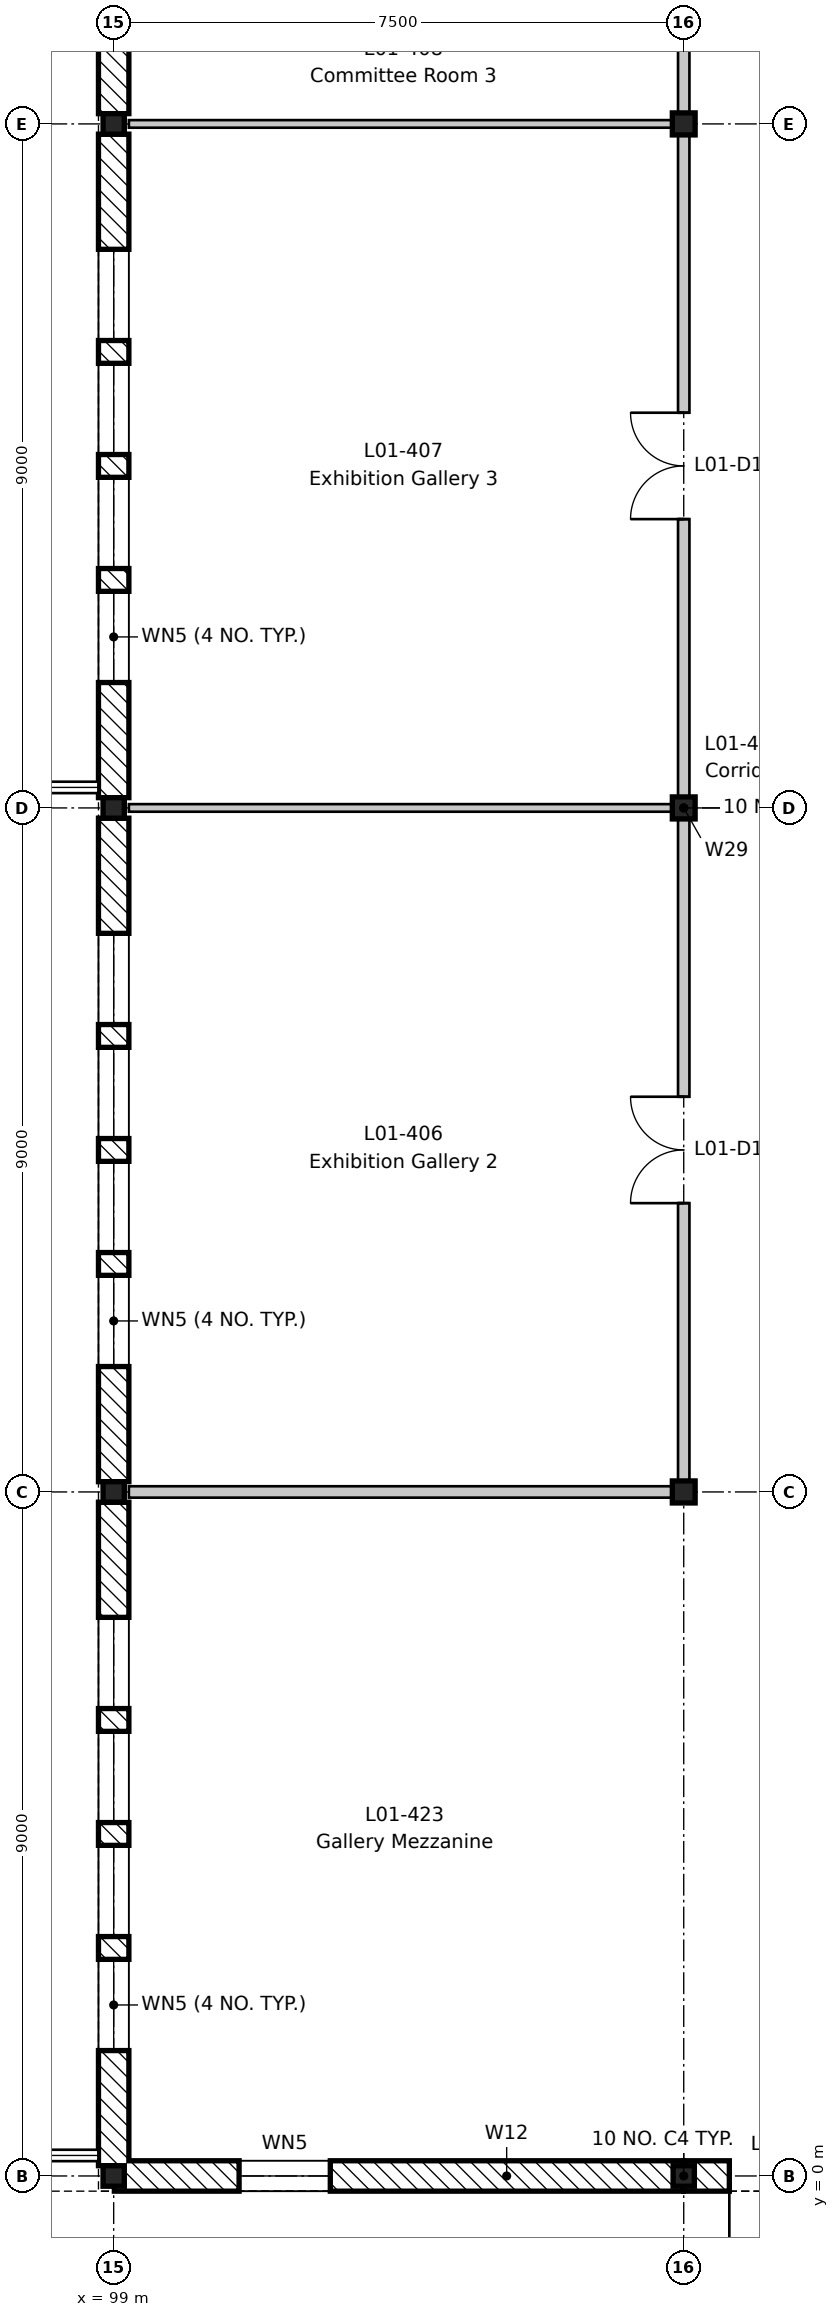
"""IFC4 building model, lengths in metres.
Left out: names, types, materials, properties, quantities, classifications, styles, units other than length and angle.
Written with IfcOpenShell. Run it as: python <this file> out.ifc"""

import sys

from ifc_helpers import new_model, si_unit, direction, frame, frame_2d, origin, origin_2d, place, context, subcontext, project, spatial, rectangle, i_section, extrude, element, fill, save


model = new_model("IFC4")
c1 = context("Model", 3, precision=1e-05, world=origin(), true_north=direction((0.0, 1.0)))
c2 = subcontext(c1, "Body", "Model", "MODEL_VIEW")
j1 = project(units=[si_unit("LENGTHUNIT", "METRE"), si_unit("PLANEANGLEUNIT", "RADIAN")], contexts=[c1])
p1 = place(None, origin())
s1 = spatial("IfcSite", under=j1, at=p1, CompositionType="ELEMENT")
p2 = place(p1, origin())
s2 = spatial("IfcBuilding", under=s1, at=p2, CompositionType="ELEMENT")
p3 = place(p2, frame((0.0, 0.0, 5.4)))
s3 = spatial("IfcBuildingStorey", under=s2, at=p3, CompositionType="ELEMENT", Elevation=5.4)
for number, where, z_axis, x_axis in (
    (1, (99.0, 0.0, -0.2), (0.0, 0.0, 1.0), (1.0, 0.0, 0.0)),
    (2, (99.0, 9.0, -0.2), (0.0, 0.0, 1.0), (1.0, 0.0, 0.0)),
    (3, (99.0, 18.0, -0.2), (0.0, 0.0, 1.0), (1.0, 0.0, 0.0)),
    (4, (99.0, 27.0, -0.2), (0.0, 0.0, 1.0), (1.0, 0.0, 0.0)),
    (5, (106.5, 0.0, -0.2), (0.0, 0.0, 1.0), (1.0, 0.0, 0.0)),
):
    element("IfcColumn", number, at=place(p3, frame(where, z_axis=z_axis, x_axis=x_axis)), inside=s3, PredefinedType="COLUMN", context=c2, shape_type="SweptSolid", body=[
        extrude(i_section(OverallWidth=0.28, OverallDepth=0.27, WebThickness=0.008, FlangeThickness=0.013, FilletRadius=0.024, at=origin_2d()), origin(), (0.0, 0.0, 1.0), 4.5),
    ])
for number, where, z_axis, x_axis in (
    (6, (106.5, 9.0, -0.2), (0.0, 0.0, 1.0), (1.0, 0.0, 0.0)),
    (7, (106.5, 18.0, -0.2), (0.0, 0.0, 1.0), (1.0, 0.0, 0.0)),
    (8, (106.5, 27.0, -0.2), (0.0, 0.0, 1.0), (1.0, 0.0, 0.0)),
):
    element("IfcColumn", number, at=place(p3, frame(where, z_axis=z_axis, x_axis=x_axis)), inside=s3, PredefinedType="COLUMN", context=c2, shape_type="SweptSolid", body=[
        extrude(i_section(OverallWidth=0.3, OverallDepth=0.29, WebThickness=0.009, FlangeThickness=0.014, FilletRadius=0.027, at=origin_2d()), origin(), (0.0, 0.0, 1.0), 4.5),
    ])
p4 = place(p3, frame((99.0, 0.135, 0.0), z_axis=(0.0, 0.0, 1.0), x_axis=(0.0, 1.0, 0.0)))
e9 = element("IfcWall", 9, at=p4, inside=s3, PredefinedType="STANDARD", context=c2, shape_type="SweptSolid", body=[
    extrude(rectangle(XDim=8.73, YDim=0.4, at=frame_2d((4.365, 0.0))), origin(), (0.0, 0.0, 1.0), 3.9),
])
p5 = place(p4, frame((1.515, 0.0, 0.6)))
e10 = element("IfcOpeningElement", 10, at=p5, cuts=e9, PredefinedType="OPENING", context=c2, shape_type="SweptSolid", body=[
    extrude(rectangle(XDim=1.2, YDim=3.0, at=frame_2d((0.6, 1.5))), frame((0.0, 0.21, 0.0), z_axis=(0.0, -1.0, 0.0), x_axis=(1.0, 0.0, 0.0)), (0.0, 0.0, 1.0), 0.42),
])
p6 = place(p4, frame((3.015, 0.0, 0.6)))
e11 = element("IfcOpeningElement", 11, at=p6, cuts=e9, PredefinedType="OPENING", context=c2, shape_type="SweptSolid", body=[
    extrude(rectangle(XDim=1.2, YDim=3.0, at=frame_2d((0.6, 1.5))), frame((0.0, 0.21, 0.0), z_axis=(0.0, -1.0, 0.0), x_axis=(1.0, 0.0, 0.0)), (0.0, 0.0, 1.0), 0.42),
])
p7 = place(p4, frame((4.515, 0.0, 0.6)))
e12 = element("IfcOpeningElement", 12, at=p7, cuts=e9, PredefinedType="OPENING", context=c2, shape_type="SweptSolid", body=[
    extrude(rectangle(XDim=1.2, YDim=3.0, at=frame_2d((0.6, 1.5))), frame((0.0, 0.21, 0.0), z_axis=(0.0, -1.0, 0.0), x_axis=(1.0, 0.0, 0.0)), (0.0, 0.0, 1.0), 0.42),
])
p8 = place(p4, frame((6.015, 0.0, 0.6)))
e13 = element("IfcOpeningElement", 13, at=p8, cuts=e9, PredefinedType="OPENING", context=c2, shape_type="SweptSolid", body=[
    extrude(rectangle(XDim=1.2, YDim=3.0, at=frame_2d((0.6, 1.5))), frame((0.0, 0.21, 0.0), z_axis=(0.0, -1.0, 0.0), x_axis=(1.0, 0.0, 0.0)), (0.0, 0.0, 1.0), 0.42),
])
p9 = place(p3, frame((99.0, 9.135, 0.0), z_axis=(0.0, 0.0, 1.0), x_axis=(0.0, 1.0, 0.0)))
e14 = element("IfcWall", 14, at=p9, inside=s3, PredefinedType="STANDARD", context=c2, shape_type="SweptSolid", body=[
    extrude(rectangle(XDim=8.73, YDim=0.4, at=frame_2d((4.365, 0.0))), origin(), (0.0, 0.0, 1.0), 3.9),
])
p10 = place(p9, frame((1.515, 0.0, 0.6)))
e15 = element("IfcOpeningElement", 15, at=p10, cuts=e14, PredefinedType="OPENING", context=c2, shape_type="SweptSolid", body=[
    extrude(rectangle(XDim=1.2, YDim=3.0, at=frame_2d((0.6, 1.5))), frame((0.0, 0.21, 0.0), z_axis=(0.0, -1.0, 0.0), x_axis=(1.0, 0.0, 0.0)), (0.0, 0.0, 1.0), 0.42),
])
p11 = place(p9, frame((3.015, 0.0, 0.6)))
e16 = element("IfcOpeningElement", 16, at=p11, cuts=e14, PredefinedType="OPENING", context=c2, shape_type="SweptSolid", body=[
    extrude(rectangle(XDim=1.2, YDim=3.0, at=frame_2d((0.6, 1.5))), frame((0.0, 0.21, 0.0), z_axis=(0.0, -1.0, 0.0), x_axis=(1.0, 0.0, 0.0)), (0.0, 0.0, 1.0), 0.42),
])
p12 = place(p9, frame((4.515, 0.0, 0.6)))
e17 = element("IfcOpeningElement", 17, at=p12, cuts=e14, PredefinedType="OPENING", context=c2, shape_type="SweptSolid", body=[
    extrude(rectangle(XDim=1.2, YDim=3.0, at=frame_2d((0.6, 1.5))), frame((0.0, 0.21, 0.0), z_axis=(0.0, -1.0, 0.0), x_axis=(1.0, 0.0, 0.0)), (0.0, 0.0, 1.0), 0.42),
])
p13 = place(p9, frame((6.015, 0.0, 0.6)))
e18 = element("IfcOpeningElement", 18, at=p13, cuts=e14, PredefinedType="OPENING", context=c2, shape_type="SweptSolid", body=[
    extrude(rectangle(XDim=1.2, YDim=3.0, at=frame_2d((0.6, 1.5))), frame((0.0, 0.21, 0.0), z_axis=(0.0, -1.0, 0.0), x_axis=(1.0, 0.0, 0.0)), (0.0, 0.0, 1.0), 0.42),
])
p14 = place(p3, frame((99.0, 18.135, 0.0), z_axis=(0.0, 0.0, 1.0), x_axis=(0.0, 1.0, 0.0)))
e19 = element("IfcWall", 19, at=p14, inside=s3, PredefinedType="STANDARD", context=c2, shape_type="SweptSolid", body=[
    extrude(rectangle(XDim=8.73, YDim=0.4, at=frame_2d((4.365, 0.0))), origin(), (0.0, 0.0, 1.0), 3.9),
])
p15 = place(p14, frame((1.515, 0.0, 0.6)))
e20 = element("IfcOpeningElement", 20, at=p15, cuts=e19, PredefinedType="OPENING", context=c2, shape_type="SweptSolid", body=[
    extrude(rectangle(XDim=1.2, YDim=3.0, at=frame_2d((0.6, 1.5))), frame((0.0, 0.21, 0.0), z_axis=(0.0, -1.0, 0.0), x_axis=(1.0, 0.0, 0.0)), (0.0, 0.0, 1.0), 0.42),
])
p16 = place(p14, frame((3.015, 0.0, 0.6)))
e21 = element("IfcOpeningElement", 21, at=p16, cuts=e19, PredefinedType="OPENING", context=c2, shape_type="SweptSolid", body=[
    extrude(rectangle(XDim=1.2, YDim=3.0, at=frame_2d((0.6, 1.5))), frame((0.0, 0.21, 0.0), z_axis=(0.0, -1.0, 0.0), x_axis=(1.0, 0.0, 0.0)), (0.0, 0.0, 1.0), 0.42),
])
p17 = place(p14, frame((4.515, 0.0, 0.6)))
e22 = element("IfcOpeningElement", 22, at=p17, cuts=e19, PredefinedType="OPENING", context=c2, shape_type="SweptSolid", body=[
    extrude(rectangle(XDim=1.2, YDim=3.0, at=frame_2d((0.6, 1.5))), frame((0.0, 0.21, 0.0), z_axis=(0.0, -1.0, 0.0), x_axis=(1.0, 0.0, 0.0)), (0.0, 0.0, 1.0), 0.42),
])
p18 = place(p14, frame((6.015, 0.0, 0.6)))
e23 = element("IfcOpeningElement", 23, at=p18, cuts=e19, PredefinedType="OPENING", context=c2, shape_type="SweptSolid", body=[
    extrude(rectangle(XDim=1.2, YDim=3.0, at=frame_2d((0.6, 1.5))), frame((0.0, 0.21, 0.0), z_axis=(0.0, -1.0, 0.0), x_axis=(1.0, 0.0, 0.0)), (0.0, 0.0, 1.0), 0.42),
])
p19 = place(p3, frame((99.0, 27.135, 0.0), z_axis=(0.0, 0.0, 1.0), x_axis=(0.0, 1.0, 0.0)))
e24 = element("IfcWall", 24, at=p19, inside=s3, PredefinedType="STANDARD", context=c2, shape_type="SweptSolid", body=[
    extrude(rectangle(XDim=8.73, YDim=0.4, at=frame_2d((4.365, 0.0))), origin(), (0.0, 0.0, 1.0), 3.9),
])
p20 = place(p19, frame((1.515, 0.0, 0.6)))
e25 = element("IfcOpeningElement", 25, at=p20, cuts=e24, PredefinedType="OPENING", context=c2, shape_type="SweptSolid", body=[
    extrude(rectangle(XDim=1.2, YDim=3.0, at=frame_2d((0.6, 1.5))), frame((0.0, 0.21, 0.0), z_axis=(0.0, -1.0, 0.0), x_axis=(1.0, 0.0, 0.0)), (0.0, 0.0, 1.0), 0.42),
])
p21 = place(p19, frame((3.015, 0.0, 0.6)))
e26 = element("IfcOpeningElement", 26, at=p21, cuts=e24, PredefinedType="OPENING", context=c2, shape_type="SweptSolid", body=[
    extrude(rectangle(XDim=1.2, YDim=3.0, at=frame_2d((0.6, 1.5))), frame((0.0, 0.21, 0.0), z_axis=(0.0, -1.0, 0.0), x_axis=(1.0, 0.0, 0.0)), (0.0, 0.0, 1.0), 0.42),
])
p22 = place(p19, frame((4.515, 0.0, 0.6)))
e27 = element("IfcOpeningElement", 27, at=p22, cuts=e24, PredefinedType="OPENING", context=c2, shape_type="SweptSolid", body=[
    extrude(rectangle(XDim=1.2, YDim=3.0, at=frame_2d((0.6, 1.5))), frame((0.0, 0.21, 0.0), z_axis=(0.0, -1.0, 0.0), x_axis=(1.0, 0.0, 0.0)), (0.0, 0.0, 1.0), 0.42),
])
p23 = place(p19, frame((6.015, 0.0, 0.6)))
e28 = element("IfcOpeningElement", 28, at=p23, cuts=e24, PredefinedType="OPENING", context=c2, shape_type="SweptSolid", body=[
    extrude(rectangle(XDim=1.2, YDim=3.0, at=frame_2d((0.6, 1.5))), frame((0.0, 0.21, 0.0), z_axis=(0.0, -1.0, 0.0), x_axis=(1.0, 0.0, 0.0)), (0.0, 0.0, 1.0), 0.42),
])
p24 = place(p3, frame((106.491, 0.0, 0.0), z_axis=(0.0, 0.0, 1.0), x_axis=(-1.0, 0.0, 0.0)))
e29 = element("IfcWall", 29, at=p24, inside=s3, PredefinedType="STANDARD", context=c2, shape_type="SweptSolid", body=[
    extrude(rectangle(XDim=7.482, YDim=0.4, at=frame_2d((3.741, 0.0))), origin(), (0.0, 0.0, 1.0), 3.97),
])
p25 = place(p24, frame((4.641, 0.0, 0.6)))
e30 = element("IfcOpeningElement", 30, at=p25, cuts=e29, PredefinedType="OPENING", context=c2, shape_type="SweptSolid", body=[
    extrude(rectangle(XDim=1.2, YDim=3.0, at=frame_2d((0.6, 1.5))), frame((0.0, 0.21, 0.0), z_axis=(0.0, -1.0, 0.0), x_axis=(1.0, 0.0, 0.0)), (0.0, 0.0, 1.0), 0.42),
])
p26 = place(p3, frame((109.491, 0.0, 0.0), z_axis=(0.0, 0.0, 1.0), x_axis=(-1.0, 0.0, 0.0)))
e31 = element("IfcWall", 31, at=p26, inside=s3, PredefinedType="STANDARD", context=c2, shape_type="SweptSolid", body=[
    extrude(rectangle(XDim=2.982, YDim=0.4, at=frame_2d((1.491, 0.0))), origin(), (0.0, 0.0, 1.0), 4.1),
])
p27 = place(p26, frame((0.591, 0.0, 0.0)))
e32 = element("IfcOpeningElement", 32, at=p27, cuts=e31, PredefinedType="OPENING", context=c2, shape_type="SweptSolid", body=[
    extrude(rectangle(XDim=1.8, YDim=2.4, at=frame_2d((0.9, 1.2))), frame((0.0, 0.21, 0.0), z_axis=(0.0, -1.0, 0.0), x_axis=(1.0, 0.0, 0.0)), (0.0, 0.0, 1.0), 0.42),
])
p28 = place(p3, frame((99.2, 9.0, 0.0), z_axis=(0.0, 0.0, 1.0), x_axis=(1.0, 0.0, 0.0)))
e33 = element("IfcWall", 33, at=p28, inside=s3, PredefinedType="PARTITIONING", context=c2, shape_type="SweptSolid", body=[
    extrude(rectangle(XDim=7.225, YDim=0.15, at=frame_2d((3.613, 0.0))), origin(), (0.0, 0.0, 1.0), 3.95),
])
for number, where, z_axis, x_axis in (
    (34, (99.2, 18.0, 0.0), (0.0, 0.0, 1.0), (1.0, 0.0, 0.0)),
    (35, (99.2, 27.0, 0.0), (0.0, 0.0, 1.0), (1.0, 0.0, 0.0)),
):
    element("IfcWall", number, at=place(p3, frame(where, z_axis=z_axis, x_axis=x_axis)), inside=s3, PredefinedType="PARTITIONING", context=c2, shape_type="SweptSolid", body=[
        extrude(rectangle(XDim=7.225, YDim=0.1, at=frame_2d((3.613, 0.0))), origin(), (0.0, 0.0, 1.0), 3.95),
    ])
p29 = place(p3, frame((106.5, 9.0, 0.0), z_axis=(0.0, 0.0, 1.0), x_axis=(0.0, 1.0, 0.0)))
e36 = element("IfcWall", 36, at=p29, inside=s3, PredefinedType="PARTITIONING", context=c2, shape_type="SweptSolid", body=[
    extrude(rectangle(XDim=44.8, YDim=0.15, at=frame_2d((22.4, 0.0))), origin(), (0.0, 0.0, 1.0), 3.78),
])
p30 = place(p29, frame((3.8, 0.0, 0.0)))
e37 = element("IfcOpeningElement", 37, at=p30, cuts=e36, PredefinedType="OPENING", context=c2, shape_type="SweptSolid", body=[
    extrude(rectangle(XDim=1.4, YDim=2.1, at=frame_2d((0.7, 1.05))), frame((0.0, 0.085, 0.0), z_axis=(0.0, -1.0, 0.0), x_axis=(1.0, 0.0, 0.0)), (0.0, 0.0, 1.0), 0.17),
])
p31 = place(p29, frame((12.8, 0.0, 0.0)))
e38 = element("IfcOpeningElement", 38, at=p31, cuts=e36, PredefinedType="OPENING", context=c2, shape_type="SweptSolid", body=[
    extrude(rectangle(XDim=1.4, YDim=2.1, at=frame_2d((0.7, 1.05))), frame((0.0, 0.085, 0.0), z_axis=(0.0, -1.0, 0.0), x_axis=(1.0, 0.0, 0.0)), (0.0, 0.0, 1.0), 0.17),
])
p32 = place(p29, frame((20.5, 0.0, 0.0)))
e39 = element("IfcOpeningElement", 39, at=p32, cuts=e36, PredefinedType="OPENING", context=c2, shape_type="SweptSolid", body=[
    extrude(rectangle(XDim=1.0, YDim=2.1, at=frame_2d((0.5, 1.05))), frame((0.0, 0.085, 0.0), z_axis=(0.0, -1.0, 0.0), x_axis=(1.0, 0.0, 0.0)), (0.0, 0.0, 1.0), 0.17),
])
p33 = place(p29, frame((27.8, 0.0, 0.0)))
e40 = element("IfcOpeningElement", 40, at=p33, cuts=e36, PredefinedType="OPENING", context=c2, shape_type="SweptSolid", body=[
    extrude(rectangle(XDim=1.4, YDim=2.1, at=frame_2d((0.7, 1.05))), frame((0.0, 0.085, 0.0), z_axis=(0.0, -1.0, 0.0), x_axis=(1.0, 0.0, 0.0)), (0.0, 0.0, 1.0), 0.17),
])
p34 = place(p29, frame((36.75, 0.0, 0.0)))
e41 = element("IfcOpeningElement", 41, at=p34, cuts=e36, PredefinedType="OPENING", context=c2, shape_type="SweptSolid", body=[
    extrude(rectangle(XDim=1.0, YDim=2.1, at=frame_2d((0.5, 1.05))), frame((0.0, 0.085, 0.0), z_axis=(0.0, -1.0, 0.0), x_axis=(1.0, 0.0, 0.0)), (0.0, 0.0, 1.0), 0.17),
])
p35 = place(p29, frame((40.0, 0.0, 0.0)))
e42 = element("IfcOpeningElement", 42, at=p35, cuts=e36, PredefinedType="OPENING", context=c2, shape_type="SweptSolid", body=[
    extrude(rectangle(XDim=1.0, YDim=2.1, at=frame_2d((0.5, 1.05))), frame((0.0, 0.085, 0.0), z_axis=(0.0, -1.0, 0.0), x_axis=(1.0, 0.0, 0.0)), (0.0, 0.0, 1.0), 0.17),
])
p36 = place(p29, frame((43.0, 0.0, 0.0)))
e43 = element("IfcOpeningElement", 43, at=p36, cuts=e36, PredefinedType="OPENING", context=c2, shape_type="SweptSolid", body=[
    extrude(rectangle(XDim=1.0, YDim=2.1, at=frame_2d((0.5, 1.05))), frame((0.0, 0.085, 0.0), z_axis=(0.0, -1.0, 0.0), x_axis=(1.0, 0.0, 0.0)), (0.0, 0.0, 1.0), 0.17),
])
p37 = place(p5, origin())
e44 = element("IfcWindow", 44, at=p37, inside=s3, PartitioningType="SINGLE_PANEL", PredefinedType="WINDOW", context=c2, shape_type="SweptSolid", body=[
    extrude(rectangle(XDim=1.2, YDim=3.0, at=frame_2d((0.6, 1.5))), frame((0.0, 0.03, 0.0), z_axis=(0.0, -1.0, 0.0), x_axis=(1.0, 0.0, 0.0)), (0.0, 0.0, 1.0), 0.06),
])
fill(e10, e44)
p38 = place(p6, origin())
e45 = element("IfcWindow", 45, at=p38, inside=s3, PartitioningType="SINGLE_PANEL", PredefinedType="WINDOW", context=c2, shape_type="SweptSolid", body=[
    extrude(rectangle(XDim=1.2, YDim=3.0, at=frame_2d((0.6, 1.5))), frame((0.0, 0.03, 0.0), z_axis=(0.0, -1.0, 0.0), x_axis=(1.0, 0.0, 0.0)), (0.0, 0.0, 1.0), 0.06),
])
fill(e11, e45)
p39 = place(p7, origin())
e46 = element("IfcWindow", 46, at=p39, inside=s3, PartitioningType="SINGLE_PANEL", PredefinedType="WINDOW", context=c2, shape_type="SweptSolid", body=[
    extrude(rectangle(XDim=1.2, YDim=3.0, at=frame_2d((0.6, 1.5))), frame((0.0, 0.03, 0.0), z_axis=(0.0, -1.0, 0.0), x_axis=(1.0, 0.0, 0.0)), (0.0, 0.0, 1.0), 0.06),
])
fill(e12, e46)
p40 = place(p8, origin())
e47 = element("IfcWindow", 47, at=p40, inside=s3, PartitioningType="SINGLE_PANEL", PredefinedType="WINDOW", context=c2, shape_type="SweptSolid", body=[
    extrude(rectangle(XDim=1.2, YDim=3.0, at=frame_2d((0.6, 1.5))), frame((0.0, 0.03, 0.0), z_axis=(0.0, -1.0, 0.0), x_axis=(1.0, 0.0, 0.0)), (0.0, 0.0, 1.0), 0.06),
])
fill(e13, e47)
p41 = place(p10, origin())
e48 = element("IfcWindow", 48, at=p41, inside=s3, PartitioningType="SINGLE_PANEL", PredefinedType="WINDOW", context=c2, shape_type="SweptSolid", body=[
    extrude(rectangle(XDim=1.2, YDim=3.0, at=frame_2d((0.6, 1.5))), frame((0.0, 0.03, 0.0), z_axis=(0.0, -1.0, 0.0), x_axis=(1.0, 0.0, 0.0)), (0.0, 0.0, 1.0), 0.06),
])
fill(e15, e48)
p42 = place(p11, origin())
e49 = element("IfcWindow", 49, at=p42, inside=s3, PartitioningType="SINGLE_PANEL", PredefinedType="WINDOW", context=c2, shape_type="SweptSolid", body=[
    extrude(rectangle(XDim=1.2, YDim=3.0, at=frame_2d((0.6, 1.5))), frame((0.0, 0.03, 0.0), z_axis=(0.0, -1.0, 0.0), x_axis=(1.0, 0.0, 0.0)), (0.0, 0.0, 1.0), 0.06),
])
fill(e16, e49)
p43 = place(p12, origin())
e50 = element("IfcWindow", 50, at=p43, inside=s3, PartitioningType="SINGLE_PANEL", PredefinedType="WINDOW", context=c2, shape_type="SweptSolid", body=[
    extrude(rectangle(XDim=1.2, YDim=3.0, at=frame_2d((0.6, 1.5))), frame((0.0, 0.03, 0.0), z_axis=(0.0, -1.0, 0.0), x_axis=(1.0, 0.0, 0.0)), (0.0, 0.0, 1.0), 0.06),
])
fill(e17, e50)
p44 = place(p13, origin())
e51 = element("IfcWindow", 51, at=p44, inside=s3, PartitioningType="SINGLE_PANEL", PredefinedType="WINDOW", context=c2, shape_type="SweptSolid", body=[
    extrude(rectangle(XDim=1.2, YDim=3.0, at=frame_2d((0.6, 1.5))), frame((0.0, 0.03, 0.0), z_axis=(0.0, -1.0, 0.0), x_axis=(1.0, 0.0, 0.0)), (0.0, 0.0, 1.0), 0.06),
])
fill(e18, e51)
p45 = place(p15, origin())
e52 = element("IfcWindow", 52, at=p45, inside=s3, PartitioningType="SINGLE_PANEL", PredefinedType="WINDOW", context=c2, shape_type="SweptSolid", body=[
    extrude(rectangle(XDim=1.2, YDim=3.0, at=frame_2d((0.6, 1.5))), frame((0.0, 0.03, 0.0), z_axis=(0.0, -1.0, 0.0), x_axis=(1.0, 0.0, 0.0)), (0.0, 0.0, 1.0), 0.06),
])
fill(e20, e52)
p46 = place(p16, origin())
e53 = element("IfcWindow", 53, at=p46, inside=s3, PartitioningType="SINGLE_PANEL", PredefinedType="WINDOW", context=c2, shape_type="SweptSolid", body=[
    extrude(rectangle(XDim=1.2, YDim=3.0, at=frame_2d((0.6, 1.5))), frame((0.0, 0.03, 0.0), z_axis=(0.0, -1.0, 0.0), x_axis=(1.0, 0.0, 0.0)), (0.0, 0.0, 1.0), 0.06),
])
fill(e21, e53)
p47 = place(p17, origin())
e54 = element("IfcWindow", 54, at=p47, inside=s3, PartitioningType="SINGLE_PANEL", PredefinedType="WINDOW", context=c2, shape_type="SweptSolid", body=[
    extrude(rectangle(XDim=1.2, YDim=3.0, at=frame_2d((0.6, 1.5))), frame((0.0, 0.03, 0.0), z_axis=(0.0, -1.0, 0.0), x_axis=(1.0, 0.0, 0.0)), (0.0, 0.0, 1.0), 0.06),
])
fill(e22, e54)
p48 = place(p18, origin())
e55 = element("IfcWindow", 55, at=p48, inside=s3, PartitioningType="SINGLE_PANEL", PredefinedType="WINDOW", context=c2, shape_type="SweptSolid", body=[
    extrude(rectangle(XDim=1.2, YDim=3.0, at=frame_2d((0.6, 1.5))), frame((0.0, 0.03, 0.0), z_axis=(0.0, -1.0, 0.0), x_axis=(1.0, 0.0, 0.0)), (0.0, 0.0, 1.0), 0.06),
])
fill(e23, e55)
p49 = place(p25, origin())
e56 = element("IfcWindow", 56, at=p49, inside=s3, PartitioningType="SINGLE_PANEL", PredefinedType="WINDOW", context=c2, shape_type="SweptSolid", body=[
    extrude(rectangle(XDim=1.2, YDim=3.0, at=frame_2d((0.6, 1.5))), frame((0.0, 0.03, 0.0), z_axis=(0.0, -1.0, 0.0), x_axis=(1.0, 0.0, 0.0)), (0.0, 0.0, 1.0), 0.06),
])
fill(e30, e56)
p50 = place(p27, origin())
e57 = element("IfcDoor", 57, at=p50, inside=s3, OperationType="DOUBLE_DOOR_SINGLE_SWING", PredefinedType="DOOR", context=c2, shape_type="SweptSolid", body=[
    extrude(rectangle(XDim=1.8, YDim=2.4, at=frame_2d((0.9, 1.2))), frame((0.0, 0.025, 0.0), z_axis=(0.0, -1.0, 0.0), x_axis=(1.0, 0.0, 0.0)), (0.0, 0.0, 1.0), 0.05),
])
fill(e32, e57)
p51 = place(p30, origin())
e58 = element("IfcDoor", 58, at=p51, inside=s3, OperationType="DOUBLE_DOOR_SINGLE_SWING", PredefinedType="DOOR", context=c2, shape_type="SweptSolid", body=[
    extrude(rectangle(XDim=1.4, YDim=2.1, at=frame_2d((0.7, 1.05))), frame((0.0, 0.025, 0.0), z_axis=(0.0, -1.0, 0.0), x_axis=(1.0, 0.0, 0.0)), (0.0, 0.0, 1.0), 0.05),
])
fill(e37, e58)
p52 = place(p31, origin())
e59 = element("IfcDoor", 59, at=p52, inside=s3, OperationType="DOUBLE_DOOR_SINGLE_SWING", PredefinedType="DOOR", context=c2, shape_type="SweptSolid", body=[
    extrude(rectangle(XDim=1.4, YDim=2.1, at=frame_2d((0.7, 1.05))), frame((0.0, 0.025, 0.0), z_axis=(0.0, -1.0, 0.0), x_axis=(1.0, 0.0, 0.0)), (0.0, 0.0, 1.0), 0.05),
])
fill(e38, e59)
save(model, sys.argv[1])
